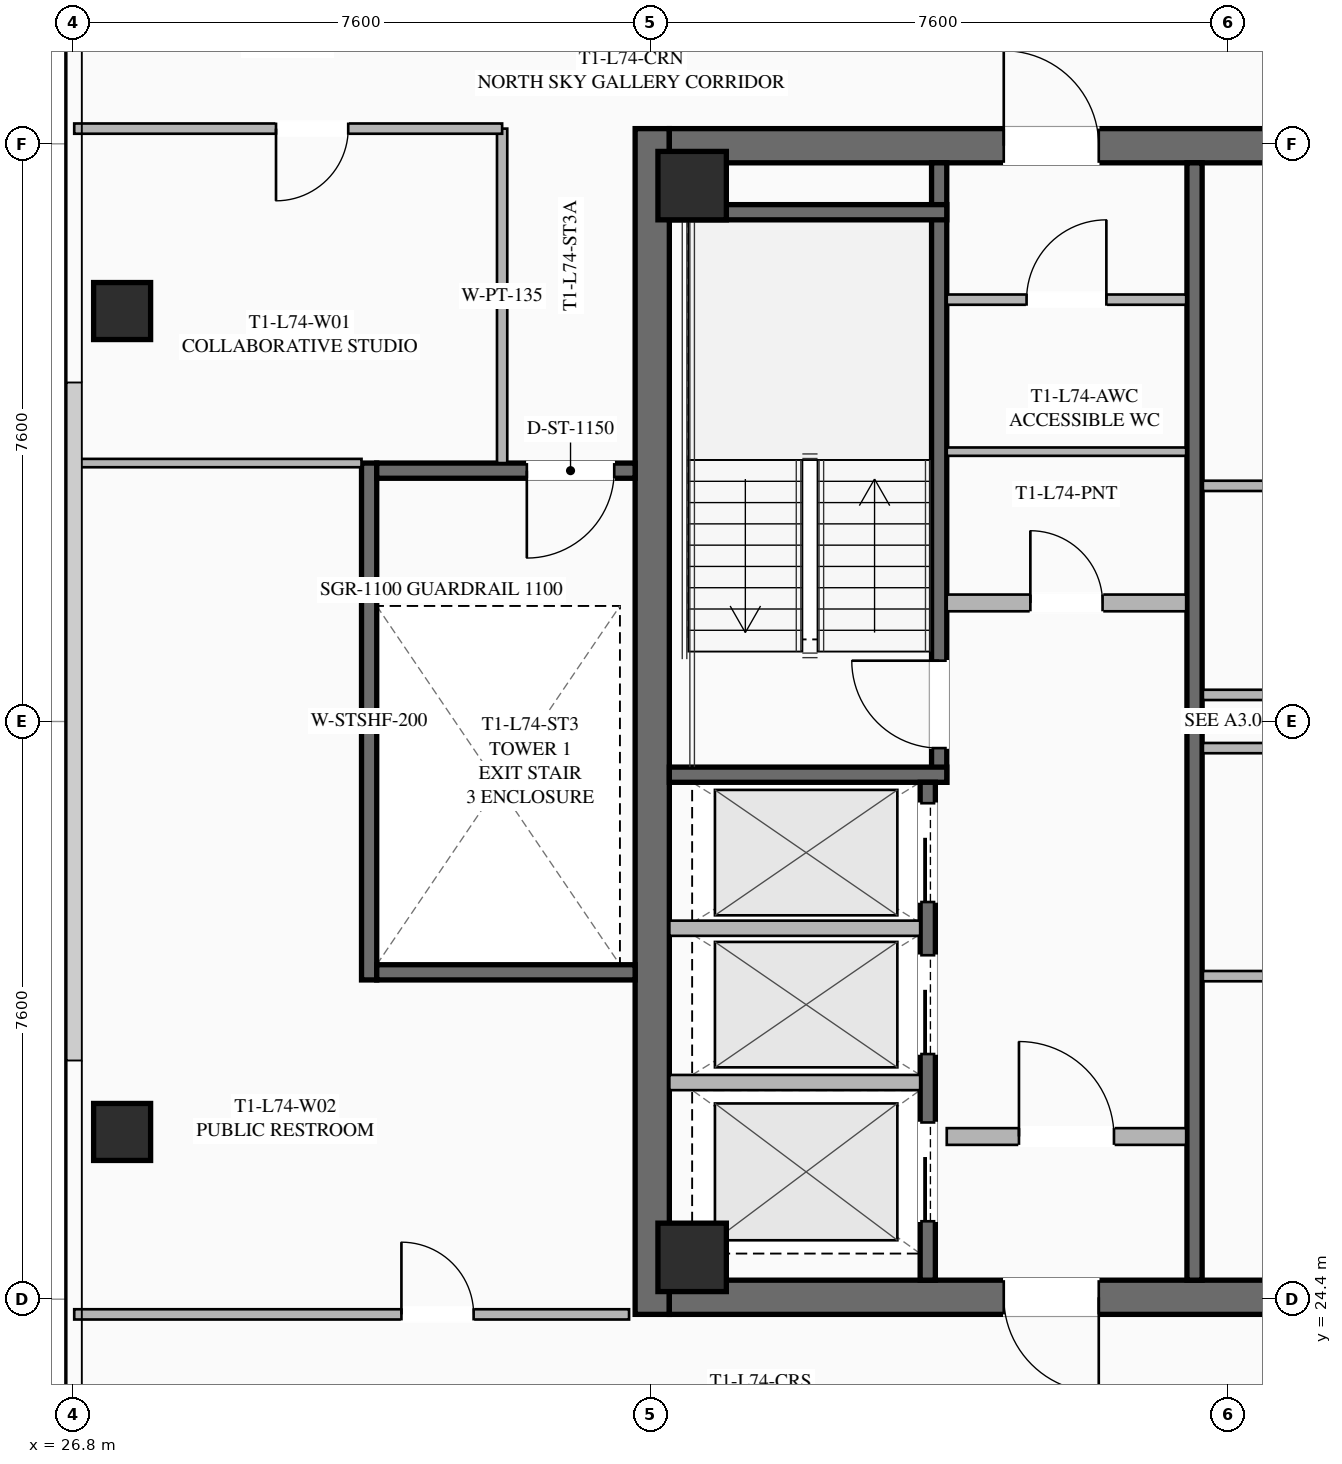
"""IFC4 building model, lengths in metres.
Left out: names, types, materials, properties, quantities, classifications, styles, units other than length and angle.
Written with IfcOpenShell. Run it as: python <this file> out.ifc"""

import sys

from ifc_helpers import new_model, si_unit, direction, frame, frame_2d, origin, origin_2d, place, context, subcontext, project, spatial, rectangle, hollow_rectangle, extrude, element, fill, save


model = new_model("IFC4")
c1 = context("Model", 3, precision=1e-05, world=origin(), true_north=direction((0.0, 1.0)))
c2 = subcontext(c1, "Body", "Model", "MODEL_VIEW")
j1 = project(units=[si_unit("LENGTHUNIT", "METRE"), si_unit("PLANEANGLEUNIT", "RADIAN")], contexts=[c1])
p1 = place(None, origin())
s1 = spatial("IfcSite", under=j1, at=p1, CompositionType="ELEMENT")
p2 = place(p1, origin())
s2 = spatial("IfcBuilding", under=s1, at=p2, CompositionType="ELEMENT")
p3 = place(p2, frame((0.0, 0.0, 274.05)))
s3 = spatial("IfcBuildingStorey", under=s2, at=p3, CompositionType="ELEMENT", Elevation=274.05)
p4 = place(p3, frame((34.425, 24.2, 0.0), z_axis=(0.0, 0.0, 1.0), x_axis=(0.0, 1.0, 0.0)))
e1 = element("IfcWall", 1, at=p4, inside=s3, PredefinedType="SHEAR", context=c2, shape_type="SweptSolid", body=[
    extrude(rectangle(XDim=15.6, YDim=0.45, at=frame_2d((7.8, 0.0))), origin(), (0.0, 0.0, 1.0), 3.55),
])
p5 = place(p3, frame((49.35, 24.425, 0.0), z_axis=(0.0, 0.0, 1.0), x_axis=(-1.0, 0.0, 0.0)))
e2 = element("IfcWall", 2, at=p5, inside=s3, PredefinedType="SHEAR", context=c2, shape_type="SweptSolid", body=[
    extrude(rectangle(XDim=14.7, YDim=0.45, at=frame_2d((7.35, 0.0))), origin(), (0.0, 0.0, 1.0), 3.55),
])
p6 = place(p5, frame((9.05, 0.0, 0.0)))
e3 = element("IfcOpeningElement", 3, at=p6, cuts=e2, PredefinedType="OPENING", context=c2, shape_type="SweptSolid", body=[
    extrude(rectangle(XDim=1.25, YDim=2.25, at=frame_2d((0.625, 1.125))), frame((0.0, 0.235, 0.0), z_axis=(0.0, -1.0, 0.0), x_axis=(1.0, 0.0, 0.0)), (0.0, 0.0, 1.0), 0.47),
])
p7 = place(p5, frame((4.0, 0.0, 0.0)))
e4 = element("IfcOpeningElement", 4, at=p7, cuts=e2, PredefinedType="OPENING", context=c2, shape_type="SweptSolid", body=[
    extrude(rectangle(XDim=1.25, YDim=2.25, at=frame_2d((0.625, 1.125))), frame((0.0, 0.235, 0.0), z_axis=(0.0, -1.0, 0.0), x_axis=(1.0, 0.0, 0.0)), (0.0, 0.0, 1.0), 0.47),
])
p8 = place(p3, frame((34.65, 39.575, 0.0), z_axis=(0.0, 0.0, 1.0), x_axis=(1.0, 0.0, 0.0)))
e5 = element("IfcWall", 5, at=p8, inside=s3, PredefinedType="SHEAR", context=c2, shape_type="SweptSolid", body=[
    extrude(rectangle(XDim=14.7, YDim=0.45, at=frame_2d((7.35, 0.0))), origin(), (0.0, 0.0, 1.0), 3.55),
])
p9 = place(p8, frame((4.4, 0.0, 0.0)))
e6 = element("IfcOpeningElement", 6, at=p9, cuts=e5, PredefinedType="OPENING", context=c2, shape_type="SweptSolid", body=[
    extrude(rectangle(XDim=1.25, YDim=2.25, at=frame_2d((0.625, 1.125))), frame((0.0, 0.235, 0.0), z_axis=(0.0, -1.0, 0.0), x_axis=(1.0, 0.0, 0.0)), (0.0, 0.0, 1.0), 0.47),
])
p10 = place(p8, frame((9.45, 0.0, 0.0)))
e7 = element("IfcOpeningElement", 7, at=p10, cuts=e5, PredefinedType="OPENING", context=c2, shape_type="SweptSolid", body=[
    extrude(rectangle(XDim=1.25, YDim=2.25, at=frame_2d((0.625, 1.125))), frame((0.0, 0.235, 0.0), z_axis=(0.0, -1.0, 0.0), x_axis=(1.0, 0.0, 0.0)), (0.0, 0.0, 1.0), 0.47),
])
for number, where, z_axis, x_axis in (
    (8, (34.95, 24.95, 0.0), (0.0, 0.0, 1.0), (1.0, 0.0, 0.0)),
    (9, (34.95, 39.05, 0.0), (0.0, 0.0, 1.0), (1.0, 0.0, 0.0)),
):
    element("IfcColumn", number, at=place(p3, frame(where, z_axis=z_axis, x_axis=x_axis)), inside=s3, PredefinedType="COLUMN", context=c2, shape_type="SweptSolid", body=[
        extrude(hollow_rectangle(XDim=0.9, YDim=0.9, WallThickness=0.04, at=origin_2d()), origin(), (0.0, 0.0, 1.0), 3.25),
    ])
for number, where, z_axis, x_axis in (
    (10, (27.45, 37.4, 0.0), (0.0, 0.0, 1.0), (1.0, 0.0, 0.0)),
    (11, (27.45, 26.6, 0.0), (0.0, 0.0, 1.0), (1.0, 0.0, 0.0)),
):
    element("IfcColumn", number, at=place(p3, frame(where, z_axis=z_axis, x_axis=x_axis)), inside=s3, PredefinedType="COLUMN", context=c2, shape_type="SweptSolid", body=[
        extrude(hollow_rectangle(XDim=0.75, YDim=0.75, WallThickness=0.032, at=origin_2d()), origin(), (0.0, 0.0, 1.0), 3.25),
    ])
p11 = place(p3, frame((38.2, 31.2, 0.0), z_axis=(0.0, 0.0, 1.0), x_axis=(0.0, 1.0, 0.0)))
e12 = element("IfcWall", 12, at=p11, inside=s3, PredefinedType="SHEAR", context=c2, shape_type="SweptSolid", body=[
    extrude(rectangle(XDim=8.15, YDim=0.2, at=frame_2d((4.075, 0.0))), origin(), (0.0, 0.0, 1.0), 3.25),
])
p12 = place(p11, frame((0.45, 0.0, 0.0)))
e13 = element("IfcOpeningElement", 13, at=p12, cuts=e12, PredefinedType="OPENING", context=c2, shape_type="SweptSolid", body=[
    extrude(rectangle(XDim=1.15, YDim=2.2, at=frame_2d((0.575, 1.1))), frame((0.0, 0.11, 0.0), z_axis=(0.0, -1.0, 0.0), x_axis=(1.0, 0.0, 0.0)), (0.0, 0.0, 1.0), 0.22),
])
for number, where, z_axis, x_axis in (
    (14, (34.65, 31.3, 0.0), (0.0, 0.0, 1.0), (1.0, 0.0, 0.0)),
    (15, (34.65, 38.7, 0.0), (0.0, 0.0, 1.0), (1.0, 0.0, 0.0)),
):
    element("IfcWall", number, at=place(p3, frame(where, z_axis=z_axis, x_axis=x_axis)), inside=s3, PredefinedType="SHEAR", context=c2, shape_type="SweptSolid", body=[
        extrude(rectangle(XDim=3.65, YDim=0.2, at=frame_2d((1.825, 0.0))), origin(), (0.0, 0.0, 1.0), 3.25),
    ])
p13 = place(p3, frame((41.56, 24.65, 0.0), z_axis=(0.0, 0.0, 1.0), x_axis=(0.0, 1.0, 0.0)))
e16 = element("IfcWall", 16, at=p13, inside=s3, PredefinedType="SHEAR", context=c2, shape_type="SweptSolid", body=[
    extrude(rectangle(XDim=14.7, YDim=0.2, at=frame_2d((7.35, 0.0))), origin(), (0.0, 0.0, 1.0), 3.25),
])
p14 = place(p3, frame((38.3, 33.56, 0.0), z_axis=(0.0, 0.0, 1.0), x_axis=(1.0, 0.0, 0.0)))
e17 = element("IfcWall", 17, at=p14, inside=s3, PredefinedType="SOLIDWALL", context=c2, shape_type="SweptSolid", body=[
    extrude(rectangle(XDim=3.15, YDim=0.22, at=frame_2d((1.575, 0.0))), origin(), (0.0, 0.0, 1.0), 2.603),
])
p15 = place(p14, frame((1.1, 0.0, 0.0)))
e18 = element("IfcOpeningElement", 18, at=p15, cuts=e17, PredefinedType="OPENING", context=c2, shape_type="SweptSolid", body=[
    extrude(rectangle(XDim=0.95, YDim=2.05, at=frame_2d((0.475, 1.025))), frame((0.0, 0.12, 0.0), z_axis=(0.0, -1.0, 0.0), x_axis=(1.0, 0.0, 0.0)), (0.0, 0.0, 1.0), 0.24),
])
p16 = place(p3, frame((38.3, 26.54, 0.0), z_axis=(0.0, 0.0, 1.0), x_axis=(1.0, 0.0, 0.0)))
e19 = element("IfcWall", 19, at=p16, inside=s3, PredefinedType="SOLIDWALL", context=c2, shape_type="SweptSolid", body=[
    extrude(rectangle(XDim=3.15, YDim=0.22, at=frame_2d((1.575, 0.0))), origin(), (0.0, 0.0, 1.0), 2.603),
])
p17 = place(p16, frame((0.95, 0.0, 0.0)))
e20 = element("IfcOpeningElement", 20, at=p17, cuts=e19, PredefinedType="OPENING", context=c2, shape_type="SweptSolid", body=[
    extrude(rectangle(XDim=1.25, YDim=2.25, at=frame_2d((0.625, 1.125))), frame((0.0, 0.12, 0.0), z_axis=(0.0, -1.0, 0.0), x_axis=(1.0, 0.0, 0.0)), (0.0, 0.0, 1.0), 0.24),
])
p18 = place(p3, frame((38.05, 24.65, 0.0), z_axis=(0.0, 0.0, 1.0), x_axis=(0.0, 1.0, 0.0)))
e21 = element("IfcWall", 21, at=p18, inside=s3, PredefinedType="SHEAR", context=c2, shape_type="SweptSolid", body=[
    extrude(rectangle(XDim=6.55, YDim=0.2, at=frame_2d((3.275, 0.0))), origin(), (0.0, 0.0, 1.0), 3.25),
])
p19 = place(p18, frame((4.975, 0.0, 0.0)))
e22 = element("IfcOpeningElement", 22, at=p19, cuts=e21, PredefinedType="OPENING", context=c2, shape_type="SweptSolid", body=[
    extrude(rectangle(XDim=1.3, YDim=2.25, at=frame_2d((0.65, 1.125))), frame((0.0, 0.11, 0.0), z_axis=(0.0, -1.0, 0.0), x_axis=(1.0, 0.0, 0.0)), (0.0, 0.0, 1.0), 0.22),
])
p20 = place(p18, frame((2.975, 0.0, 0.0)))
e23 = element("IfcOpeningElement", 23, at=p20, cuts=e21, PredefinedType="OPENING", context=c2, shape_type="SweptSolid", body=[
    extrude(rectangle(XDim=1.3, YDim=2.25, at=frame_2d((0.65, 1.125))), frame((0.0, 0.11, 0.0), z_axis=(0.0, -1.0, 0.0), x_axis=(1.0, 0.0, 0.0)), (0.0, 0.0, 1.0), 0.22),
])
p21 = place(p18, frame((0.775, 0.0, 0.0)))
e24 = element("IfcOpeningElement", 24, at=p21, cuts=e21, PredefinedType="OPENING", context=c2, shape_type="SweptSolid", body=[
    extrude(rectangle(XDim=1.3, YDim=2.25, at=frame_2d((0.65, 1.125))), frame((0.0, 0.11, 0.0), z_axis=(0.0, -1.0, 0.0), x_axis=(1.0, 0.0, 0.0)), (0.0, 0.0, 1.0), 0.22),
])
for number, where, z_axis, x_axis in (
    (25, (34.65, 27.25, 0.0), (0.0, 0.0, 1.0), (1.0, 0.0, 0.0)),
    (26, (34.65, 29.28, 0.0), (0.0, 0.0, 1.0), (1.0, 0.0, 0.0)),
):
    element("IfcWall", number, at=place(p3, frame(where, z_axis=z_axis, x_axis=x_axis)), inside=s3, PredefinedType="SOLIDWALL", context=c2, shape_type="SweptSolid", body=[
        extrude(rectangle(XDim=3.3, YDim=0.2, at=frame_2d((1.65, 0.0))), origin(), (0.0, 0.0, 1.0), 3.25),
    ])
p22 = place(p3, frame((38.3, 37.55, 0.0), z_axis=(0.0, 0.0, 1.0), x_axis=(1.0, 0.0, 0.0)))
e27 = element("IfcWall", 27, at=p22, inside=s3, PredefinedType="PARTITIONING", context=c2, shape_type="SweptSolid", body=[
    extrude(rectangle(XDim=3.15, YDim=0.135, at=frame_2d((1.575, 0.0))), origin(), (0.0, 0.0, 1.0), 2.603),
])
p23 = place(p22, frame((1.05, 0.0, 0.0)))
e28 = element("IfcOpeningElement", 28, at=p23, cuts=e27, PredefinedType="OPENING", context=c2, shape_type="SweptSolid", body=[
    extrude(rectangle(XDim=1.05, YDim=2.2, at=frame_2d((0.525, 1.1))), frame((0.0, 0.077, 0.0), z_axis=(0.0, -1.0, 0.0), x_axis=(1.0, 0.0, 0.0)), (0.0, 0.0, 1.0), 0.155),
])
p24 = place(p3, frame((38.3, 35.55, 0.0), z_axis=(0.0, 0.0, 1.0), x_axis=(1.0, 0.0, 0.0)))
e29 = element("IfcWall", 29, at=p24, inside=s3, PredefinedType="PARTITIONING", context=c2, shape_type="SweptSolid", body=[
    extrude(rectangle(XDim=3.15, YDim=0.11, at=frame_2d((1.575, 0.0))), origin(), (0.0, 0.0, 1.0), 2.603),
])
for number, where, z_axis, x_axis in (
    (30, (41.67, 31.65, 0.0), (0.0, 0.0, 1.0), (1.0, 0.0, 0.0)),
    (31, (41.67, 28.65, 0.0), (0.0, 0.0, 1.0), (1.0, 0.0, 0.0)),
    (32, (41.67, 32.35, 0.0), (0.0, 0.0, 1.0), (1.0, 0.0, 0.0)),
    (33, (41.67, 35.1, 0.0), (0.0, 0.0, 1.0), (1.0, 0.0, 0.0)),
):
    element("IfcWall", number, at=place(p3, frame(where, z_axis=z_axis, x_axis=x_axis)), inside=s3, PredefinedType="PARTITIONING", context=c2, shape_type="SweptSolid", body=[
        extrude(rectangle(XDim=1.88, YDim=0.135, at=frame_2d((0.94, 0.0))), origin(), (0.0, 0.0, 1.0), 2.603),
    ])
p25 = place(p3, frame((30.7, 28.6, 0.0), z_axis=(0.0, 0.0, 1.0), x_axis=(0.0, 1.0, 0.0)))
e34 = element("IfcWall", 34, at=p25, inside=s3, PredefinedType="SHEAR", context=c2, shape_type="SweptSolid", body=[
    extrude(rectangle(XDim=6.8, YDim=0.2, at=frame_2d((3.4, 0.0))), origin(), (0.0, 0.0, 1.0), 3.25),
])
p26 = place(p3, frame((34.2, 35.3, 0.0), z_axis=(0.0, 0.0, 1.0), x_axis=(-1.0, 0.0, 0.0)))
e35 = element("IfcWall", 35, at=p26, inside=s3, PredefinedType="SHEAR", context=c2, shape_type="SweptSolid", body=[
    extrude(rectangle(XDim=3.4, YDim=0.2, at=frame_2d((1.7, 0.0))), origin(), (0.0, 0.0, 1.0), 3.25),
])
p27 = place(p26, frame((0.275, 0.0, 0.0)))
e36 = element("IfcOpeningElement", 36, at=p27, cuts=e35, PredefinedType="OPENING", context=c2, shape_type="SweptSolid", body=[
    extrude(rectangle(XDim=1.15, YDim=2.2, at=frame_2d((0.575, 1.1))), frame((0.0, 0.11, 0.0), z_axis=(0.0, -1.0, 0.0), x_axis=(1.0, 0.0, 0.0)), (0.0, 0.0, 1.0), 0.22),
])
p28 = place(p3, frame((30.8, 28.7, 0.0), z_axis=(0.0, 0.0, 1.0), x_axis=(1.0, 0.0, 0.0)))
e37 = element("IfcWall", 37, at=p28, inside=s3, PredefinedType="SHEAR", context=c2, shape_type="SweptSolid", body=[
    extrude(rectangle(XDim=3.4, YDim=0.2, at=frame_2d((1.7, 0.0))), origin(), (0.0, 0.0, 1.0), 3.25),
])
p29 = place(p3, frame((32.45, 35.4, 0.0), z_axis=(0.0, 0.0, 1.0), x_axis=(0.0, 1.0, 0.0)))
e38 = element("IfcWall", 38, at=p29, inside=s3, PredefinedType="PARTITIONING", context=c2, shape_type="SweptSolid", body=[
    extrude(rectangle(XDim=4.4, YDim=0.135, at=frame_2d((2.2, 0.0))), origin(), (0.0, 0.0, 1.0), 2.603),
])
p30 = place(p3, frame((32.45, 39.8, 0.0), z_axis=(0.0, 0.0, 1.0), x_axis=(-1.0, 0.0, 0.0)))
e39 = element("IfcWall", 39, at=p30, inside=s3, PredefinedType="PARTITIONING", context=c2, shape_type="SweptSolid", body=[
    extrude(rectangle(XDim=5.63, YDim=0.135, at=frame_2d((2.815, 0.0))), origin(), (0.0, 0.0, 1.0), 2.603),
])
p31 = place(p30, frame((2.025, 0.0, 0.0)))
e40 = element("IfcOpeningElement", 40, at=p31, cuts=e39, PredefinedType="OPENING", context=c2, shape_type="SweptSolid", body=[
    extrude(rectangle(XDim=0.95, YDim=2.05, at=frame_2d((0.475, 1.025))), frame((0.0, 0.077, 0.0), z_axis=(0.0, -1.0, 0.0), x_axis=(1.0, 0.0, 0.0)), (0.0, 0.0, 1.0), 0.155),
])
p32 = place(p3, frame((26.82, 24.2, 0.0), z_axis=(0.0, 0.0, 1.0), x_axis=(1.0, 0.0, 0.0)))
e41 = element("IfcWall", 41, at=p32, inside=s3, PredefinedType="PARTITIONING", context=c2, shape_type="SweptSolid", body=[
    extrude(rectangle(XDim=7.3, YDim=0.135, at=frame_2d((3.65, 0.0))), origin(), (0.0, 0.0, 1.0), 2.603),
])
p33 = place(p32, frame((4.305, 0.0, 0.0)))
e42 = element("IfcOpeningElement", 42, at=p33, cuts=e41, PredefinedType="OPENING", context=c2, shape_type="SweptSolid", body=[
    extrude(rectangle(XDim=0.95, YDim=2.05, at=frame_2d((0.475, 1.025))), frame((0.0, 0.077, 0.0), z_axis=(0.0, -1.0, 0.0), x_axis=(1.0, 0.0, 0.0)), (0.0, 0.0, 1.0), 0.155),
])
p34 = place(p3, frame((30.6, 35.4, 0.0), z_axis=(0.0, 0.0, 1.0), x_axis=(-1.0, 0.0, 0.0)))
e43 = element("IfcWall", 43, at=p34, inside=s3, PredefinedType="PARTITIONING", context=c2, shape_type="SweptSolid", body=[
    extrude(rectangle(XDim=3.78, YDim=0.11, at=frame_2d((1.89, 0.0))), origin(), (0.0, 0.0, 1.0), 2.603),
])
p35 = place(p9, origin())
e44 = element("IfcDoor", 44, at=p35, inside=s3, OperationType="SINGLE_SWING_LEFT", PredefinedType="DOOR", context=c2, shape_type="SweptSolid", body=[
    extrude(rectangle(XDim=1.25, YDim=2.25, at=frame_2d((0.625, 1.125))), frame((0.0, 0.025, 0.0), z_axis=(0.0, -1.0, 0.0), x_axis=(1.0, 0.0, 0.0)), (0.0, 0.0, 1.0), 0.05),
])
fill(e6, e44)
p36 = place(p6, origin())
e45 = element("IfcDoor", 45, at=p36, inside=s3, OperationType="SINGLE_SWING_LEFT", PredefinedType="DOOR", context=c2, shape_type="SweptSolid", body=[
    extrude(rectangle(XDim=1.25, YDim=2.25, at=frame_2d((0.625, 1.125))), frame((0.0, 0.025, 0.0), z_axis=(0.0, -1.0, 0.0), x_axis=(1.0, 0.0, 0.0)), (0.0, 0.0, 1.0), 0.05),
])
fill(e3, e45)
p37 = place(p12, origin())
e46 = element("IfcDoor", 46, at=p37, inside=s3, OperationType="SINGLE_SWING_RIGHT", PredefinedType="DOOR", context=c2, shape_type="SweptSolid", body=[
    extrude(rectangle(XDim=1.15, YDim=2.2, at=frame_2d((0.575, 1.1))), frame((0.0, 0.025, 0.0), z_axis=(0.0, -1.0, 0.0), x_axis=(1.0, 0.0, 0.0)), (0.0, 0.0, 1.0), 0.05),
])
fill(e13, e46)
p38 = place(p17, origin())
e47 = element("IfcDoor", 47, at=p38, inside=s3, OperationType="SINGLE_SWING_LEFT", PredefinedType="DOOR", context=c2, shape_type="SweptSolid", body=[
    extrude(rectangle(XDim=1.25, YDim=2.25, at=frame_2d((0.625, 1.125))), frame((0.0, 0.025, 0.0), z_axis=(0.0, -1.0, 0.0), x_axis=(1.0, 0.0, 0.0)), (0.0, 0.0, 1.0), 0.05),
])
fill(e20, e47)
p39 = place(p23, origin())
e48 = element("IfcDoor", 48, at=p39, inside=s3, OperationType="SINGLE_SWING_RIGHT", PredefinedType="DOOR", context=c2, shape_type="SweptSolid", body=[
    extrude(rectangle(XDim=1.05, YDim=2.2, at=frame_2d((0.525, 1.1))), frame((0.0, 0.025, 0.0), z_axis=(0.0, -1.0, 0.0), x_axis=(1.0, 0.0, 0.0)), (0.0, 0.0, 1.0), 0.05),
])
fill(e28, e48)
p40 = place(p15, origin())
e49 = element("IfcDoor", 49, at=p40, inside=s3, OperationType="SINGLE_SWING_LEFT", PredefinedType="DOOR", context=c2, shape_type="SweptSolid", body=[
    extrude(rectangle(XDim=0.95, YDim=2.05, at=frame_2d((0.475, 1.025))), frame((0.0, 0.025, 0.0), z_axis=(0.0, -1.0, 0.0), x_axis=(1.0, 0.0, 0.0)), (0.0, 0.0, 1.0), 0.05),
])
fill(e18, e49)
p41 = place(p27, origin())
e50 = element("IfcDoor", 50, at=p41, inside=s3, OperationType="SINGLE_SWING_RIGHT", PredefinedType="DOOR", context=c2, shape_type="SweptSolid", body=[
    extrude(rectangle(XDim=1.15, YDim=2.2, at=frame_2d((0.575, 1.1))), frame((0.0, 0.025, 0.0), z_axis=(0.0, -1.0, 0.0), x_axis=(1.0, 0.0, 0.0)), (0.0, 0.0, 1.0), 0.05),
])
fill(e36, e50)
p42 = place(p31, origin())
e51 = element("IfcDoor", 51, at=p42, inside=s3, OperationType="SINGLE_SWING_RIGHT", PredefinedType="DOOR", context=c2, shape_type="SweptSolid", body=[
    extrude(rectangle(XDim=0.95, YDim=2.05, at=frame_2d((0.475, 1.025))), frame((0.0, 0.025, 0.0), z_axis=(0.0, -1.0, 0.0), x_axis=(1.0, 0.0, 0.0)), (0.0, 0.0, 1.0), 0.05),
])
fill(e40, e51)
p43 = place(p33, origin())
e52 = element("IfcDoor", 52, at=p43, inside=s3, OperationType="SINGLE_SWING_LEFT", PredefinedType="DOOR", context=c2, shape_type="SweptSolid", body=[
    extrude(rectangle(XDim=0.95, YDim=2.05, at=frame_2d((0.475, 1.025))), frame((0.0, 0.025, 0.0), z_axis=(0.0, -1.0, 0.0), x_axis=(1.0, 0.0, 0.0)), (0.0, 0.0, 1.0), 0.05),
])
fill(e42, e52)
p44 = place(p19, origin())
e53 = element("IfcDoor", 53, at=p44, inside=s3, OperationType="SLIDING_TO_LEFT", PredefinedType="DOOR", context=c2, shape_type="SweptSolid", body=[
    extrude(rectangle(XDim=1.3, YDim=2.25, at=frame_2d((0.65, 1.125))), frame((0.0, 0.025, 0.0), z_axis=(0.0, -1.0, 0.0), x_axis=(1.0, 0.0, 0.0)), (0.0, 0.0, 1.0), 0.05),
])
fill(e22, e53)
p45 = place(p20, origin())
e54 = element("IfcDoor", 54, at=p45, inside=s3, OperationType="SLIDING_TO_LEFT", PredefinedType="DOOR", context=c2, shape_type="SweptSolid", body=[
    extrude(rectangle(XDim=1.3, YDim=2.25, at=frame_2d((0.65, 1.125))), frame((0.0, 0.025, 0.0), z_axis=(0.0, -1.0, 0.0), x_axis=(1.0, 0.0, 0.0)), (0.0, 0.0, 1.0), 0.05),
])
fill(e23, e54)
p46 = place(p21, origin())
e55 = element("IfcDoor", 55, at=p46, inside=s3, OperationType="SLIDING_TO_LEFT", PredefinedType="DOOR", context=c2, shape_type="SweptSolid", body=[
    extrude(rectangle(XDim=1.3, YDim=2.25, at=frame_2d((0.65, 1.125))), frame((0.0, 0.025, 0.0), z_axis=(0.0, -1.0, 0.0), x_axis=(1.0, 0.0, 0.0)), (0.0, 0.0, 1.0), 0.05),
])
fill(e24, e55)
save(model, sys.argv[1])
